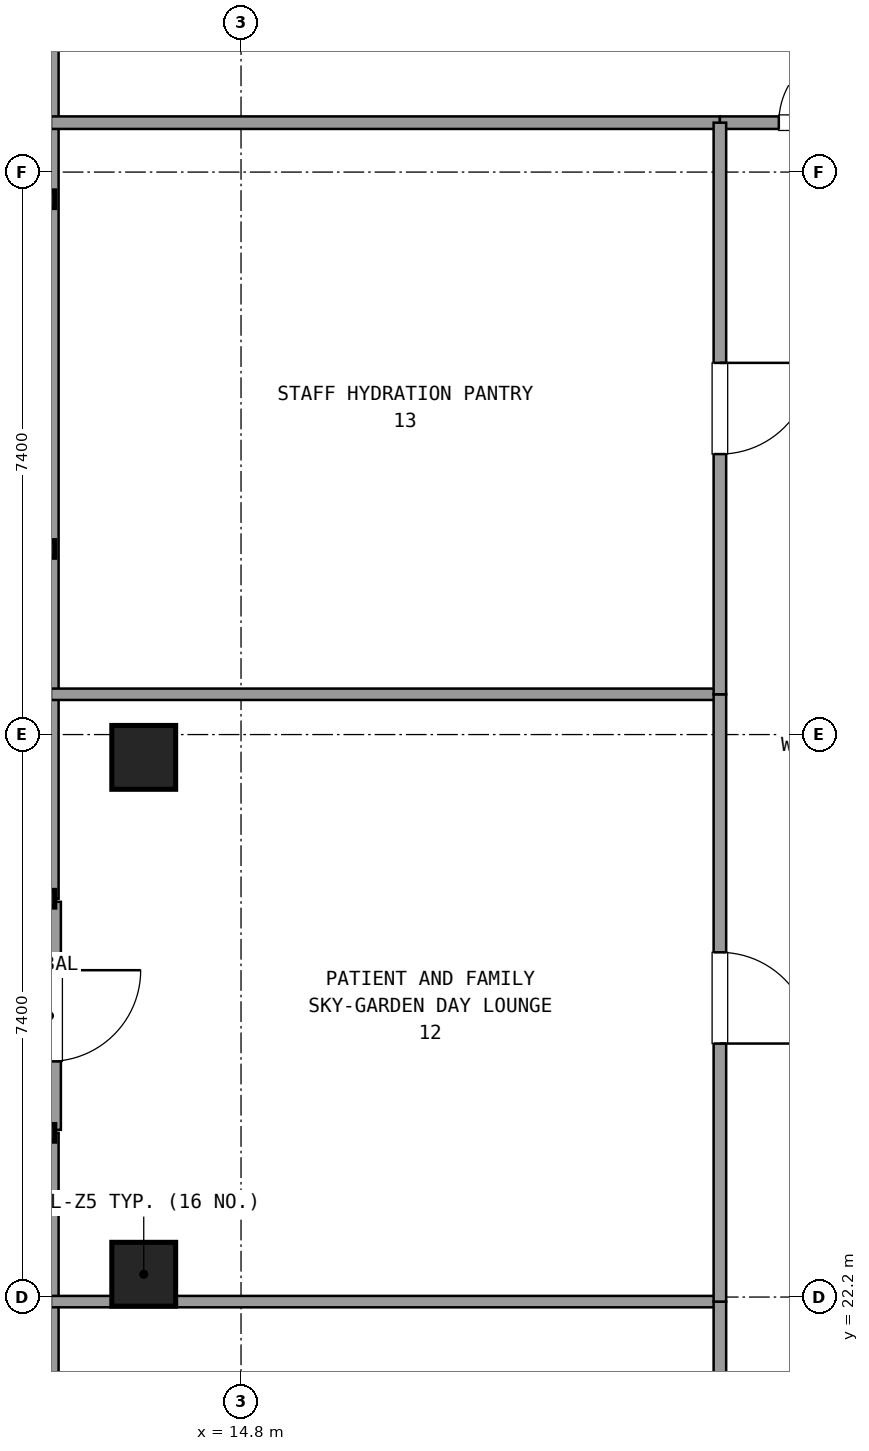
"""IFC4 building model, lengths in metres.
Left out: names, types, materials, properties, quantities, classifications, styles, units other than length and angle.
Written with IfcOpenShell. Run it as: python <this file> out.ifc"""

import sys

from ifc_helpers import new_model, si_unit, direction, frame, frame_2d, origin, origin_2d, place, context, subcontext, project, spatial, rectangle, extrude, element, fill, save


model = new_model("IFC4")
c1 = context("Model", 3, precision=1e-05, world=origin(), true_north=direction((0.0, 1.0)))
c2 = subcontext(c1, "Body", "Model", "MODEL_VIEW")
j1 = project(units=[si_unit("LENGTHUNIT", "METRE"), si_unit("PLANEANGLEUNIT", "RADIAN")], contexts=[c1])
p1 = place(None, origin())
s1 = spatial("IfcSite", under=j1, at=p1, CompositionType="ELEMENT")
p2 = place(p1, origin())
s2 = spatial("IfcBuilding", under=s1, at=p2, CompositionType="ELEMENT")
p3 = place(p2, frame((0.0, 0.0, 264.42)))
s3 = spatial("IfcBuildingStorey", under=s2, at=p3, CompositionType="ELEMENT", Elevation=264.42)
for number, where, z_axis, x_axis in (
    (1, (13.52, 22.5, 0.0), (0.0, 0.0, 1.0), (1.0, 0.0, 0.0)),
    (2, (13.52, 29.3, 0.0), (0.0, 0.0, 1.0), (1.0, 0.0, 0.0)),
):
    element("IfcColumn", number, at=place(p3, frame(where, z_axis=z_axis, x_axis=x_axis)), inside=s3, PredefinedType="COLUMN", context=c2, shape_type="SweptSolid", body=[
        extrude(rectangle(XDim=0.84, YDim=0.84, at=origin_2d()), origin(), (0.0, 0.0, 1.0), 3.6),
    ])
p4 = place(p3, frame((12.28, 27.4, 0.0), z_axis=(0.0, 0.0, 1.0), x_axis=(0.0, -1.0, 0.0)))
e3 = element("IfcWall", 3, at=p4, inside=s3, PredefinedType="SOLIDWALL", context=c2, shape_type="SweptSolid", body=[
    extrude(rectangle(XDim=3.0, YDim=0.3, at=frame_2d((1.5, 0.0))), origin(), (0.0, 0.0, 1.0), 2.69),
])
p5 = place(p4, frame((0.9, 0.0, 0.0)))
e4 = element("IfcOpeningElement", 4, at=p5, cuts=e3, PredefinedType="OPENING", context=c2, shape_type="SweptSolid", body=[
    extrude(rectangle(XDim=1.2, YDim=2.2, at=frame_2d((0.6, 1.1))), frame((0.0, 0.16, 0.0), z_axis=(0.0, -1.0, 0.0), x_axis=(1.0, 0.0, 0.0)), (0.0, 0.0, 1.0), 0.32),
])
for number, where, z_axis, x_axis in (
    (5, (12.28, 41.245, 0.0), (0.0, 0.0, 1.0), (0.0, -1.0, 0.0)),
    (6, (12.28, 24.36, 0.0), (0.0, 0.0, 1.0), (0.0, -1.0, 0.0)),
):
    element("IfcWall", number, at=place(p3, frame(where, z_axis=z_axis, x_axis=x_axis)), inside=s3, PredefinedType="SOLIDWALL", context=c2, shape_type="SweptSolid", body=[
        extrude(rectangle(XDim=13.805, YDim=0.24, at=frame_2d((6.903, 0.0))), origin(), (0.0, 0.0, 1.0), 0.85),
    ])
p6 = place(p3, frame((12.3, 37.65, 0.0), z_axis=(0.0, 0.0, 1.0), x_axis=(1.0, 0.0, 0.0)))
e7 = element("IfcWall", 7, at=p6, inside=s3, PredefinedType="PARTITIONING", context=c2, shape_type="SweptSolid", body=[
    extrude(rectangle(XDim=8.8, YDim=0.165, at=frame_2d((4.4, 0.0))), origin(), (0.0, 0.0, 1.0), 2.61),
])
p7 = place(p3, frame((21.1, 37.65, 0.0), z_axis=(0.0, 0.0, 1.0), x_axis=(1.0, 0.0, 0.0)))
e8 = element("IfcWall", 8, at=p7, inside=s3, PredefinedType="PARTITIONING", context=c2, shape_type="SweptSolid", body=[
    extrude(rectangle(XDim=2.55, YDim=0.165, at=frame_2d((1.275, 0.0))), origin(), (0.0, 0.0, 1.0), 2.61),
])
p8 = place(p7, frame((0.775, 0.0, 0.0)))
e9 = element("IfcOpeningElement", 9, at=p8, cuts=e8, PredefinedType="OPENING", context=c2, shape_type="SweptSolid", body=[
    extrude(rectangle(XDim=1.0, YDim=2.15, at=frame_2d((0.5, 1.075))), frame((0.0, 0.093, 0.0), z_axis=(0.0, -1.0, 0.0), x_axis=(1.0, 0.0, 0.0)), (0.0, 0.0, 1.0), 0.185),
])
p9 = place(p3, frame((21.1, 22.14, 0.0), z_axis=(0.0, 0.0, 1.0), x_axis=(-1.0, 0.0, 0.0)))
e10 = element("IfcWall", 10, at=p9, inside=s3, PredefinedType="PARTITIONING", context=c2, shape_type="SweptSolid", body=[
    extrude(rectangle(XDim=8.8, YDim=0.15, at=frame_2d((4.4, 0.0))), origin(), (0.0, 0.0, 1.0), 2.61),
])
p10 = place(p3, frame((21.1, 14.15, 0.0), z_axis=(0.0, 0.0, 1.0), x_axis=(0.0, 1.0, 0.0)))
e11 = element("IfcWall", 11, at=p10, inside=s3, PredefinedType="PARTITIONING", context=c2, shape_type="SweptSolid", body=[
    extrude(rectangle(XDim=7.99, YDim=0.165, at=frame_2d((3.995, 0.0))), origin(), (0.0, 0.0, 1.0), 2.61),
])
p11 = place(p10, frame((3.395, 0.0, 0.0)))
e12 = element("IfcOpeningElement", 12, at=p11, cuts=e11, PredefinedType="OPENING", context=c2, shape_type="SweptSolid", body=[
    extrude(rectangle(XDim=1.2, YDim=2.15, at=frame_2d((0.6, 1.075))), frame((0.0, 0.093, 0.0), z_axis=(0.0, -1.0, 0.0), x_axis=(1.0, 0.0, 0.0)), (0.0, 0.0, 1.0), 0.185),
])
p12 = place(p3, frame((21.1, 30.13, 0.0), z_axis=(0.0, 0.0, 1.0), x_axis=(-1.0, 0.0, 0.0)))
e13 = element("IfcWall", 13, at=p12, inside=s3, PredefinedType="PARTITIONING", context=c2, shape_type="SweptSolid", body=[
    extrude(rectangle(XDim=8.8, YDim=0.15, at=frame_2d((4.4, 0.0))), origin(), (0.0, 0.0, 1.0), 2.61),
])
p13 = place(p3, frame((21.1, 22.14, 0.0), z_axis=(0.0, 0.0, 1.0), x_axis=(0.0, 1.0, 0.0)))
e14 = element("IfcWall", 14, at=p13, inside=s3, PredefinedType="PARTITIONING", context=c2, shape_type="SweptSolid", body=[
    extrude(rectangle(XDim=7.99, YDim=0.165, at=frame_2d((3.995, 0.0))), origin(), (0.0, 0.0, 1.0), 2.61),
])
p14 = place(p13, frame((3.395, 0.0, 0.0)))
e15 = element("IfcOpeningElement", 15, at=p14, cuts=e14, PredefinedType="OPENING", context=c2, shape_type="SweptSolid", body=[
    extrude(rectangle(XDim=1.2, YDim=2.15, at=frame_2d((0.6, 1.075))), frame((0.0, 0.093, 0.0), z_axis=(0.0, -1.0, 0.0), x_axis=(1.0, 0.0, 0.0)), (0.0, 0.0, 1.0), 0.185),
])
p15 = place(p3, frame((21.1, 30.13, 0.0), z_axis=(0.0, 0.0, 1.0), x_axis=(0.0, 1.0, 0.0)))
e16 = element("IfcWall", 16, at=p15, inside=s3, PredefinedType="PARTITIONING", context=c2, shape_type="SweptSolid", body=[
    extrude(rectangle(XDim=7.52, YDim=0.165, at=frame_2d((3.76, 0.0))), origin(), (0.0, 0.0, 1.0), 2.61),
])
p16 = place(p15, frame((3.16, 0.0, 0.0)))
e17 = element("IfcOpeningElement", 17, at=p16, cuts=e16, PredefinedType="OPENING", context=c2, shape_type="SweptSolid", body=[
    extrude(rectangle(XDim=1.2, YDim=2.15, at=frame_2d((0.6, 1.075))), frame((0.0, 0.093, 0.0), z_axis=(0.0, -1.0, 0.0), x_axis=(1.0, 0.0, 0.0)), (0.0, 0.0, 1.0), 0.185),
])
p17 = place(p8, origin())
e18 = element("IfcDoor", 18, at=p17, inside=s3, OperationType="SINGLE_SWING_RIGHT", PredefinedType="DOOR", context=c2, shape_type="SweptSolid", body=[
    extrude(rectangle(XDim=1.0, YDim=2.15, at=frame_2d((0.5, 1.075))), frame((0.0, 0.025, 0.0), z_axis=(0.0, -1.0, 0.0), x_axis=(1.0, 0.0, 0.0)), (0.0, 0.0, 1.0), 0.05),
])
fill(e9, e18)
p18 = place(p14, frame((1.2, 0.0, 0.0), z_axis=(0.0, 0.0, 1.0), x_axis=(-1.0, 0.0, 0.0)))
e19 = element("IfcDoor", 19, at=p18, inside=s3, OperationType="SINGLE_SWING_LEFT", PredefinedType="DOOR", context=c2, shape_type="SweptSolid", body=[
    extrude(rectangle(XDim=1.2, YDim=2.15, at=frame_2d((0.6, 1.075))), frame((0.0, 0.025, 0.0), z_axis=(0.0, -1.0, 0.0), x_axis=(1.0, 0.0, 0.0)), (0.0, 0.0, 1.0), 0.05),
])
fill(e15, e19)
p19 = place(p16, frame((1.2, 0.0, 0.0), z_axis=(0.0, 0.0, 1.0), x_axis=(-1.0, 0.0, 0.0)))
e20 = element("IfcDoor", 20, at=p19, inside=s3, OperationType="SINGLE_SWING_RIGHT", PredefinedType="DOOR", context=c2, shape_type="SweptSolid", body=[
    extrude(rectangle(XDim=1.2, YDim=2.15, at=frame_2d((0.6, 1.075))), frame((0.0, 0.025, 0.0), z_axis=(0.0, -1.0, 0.0), x_axis=(1.0, 0.0, 0.0)), (0.0, 0.0, 1.0), 0.05),
])
fill(e17, e20)
save(model, sys.argv[1])
